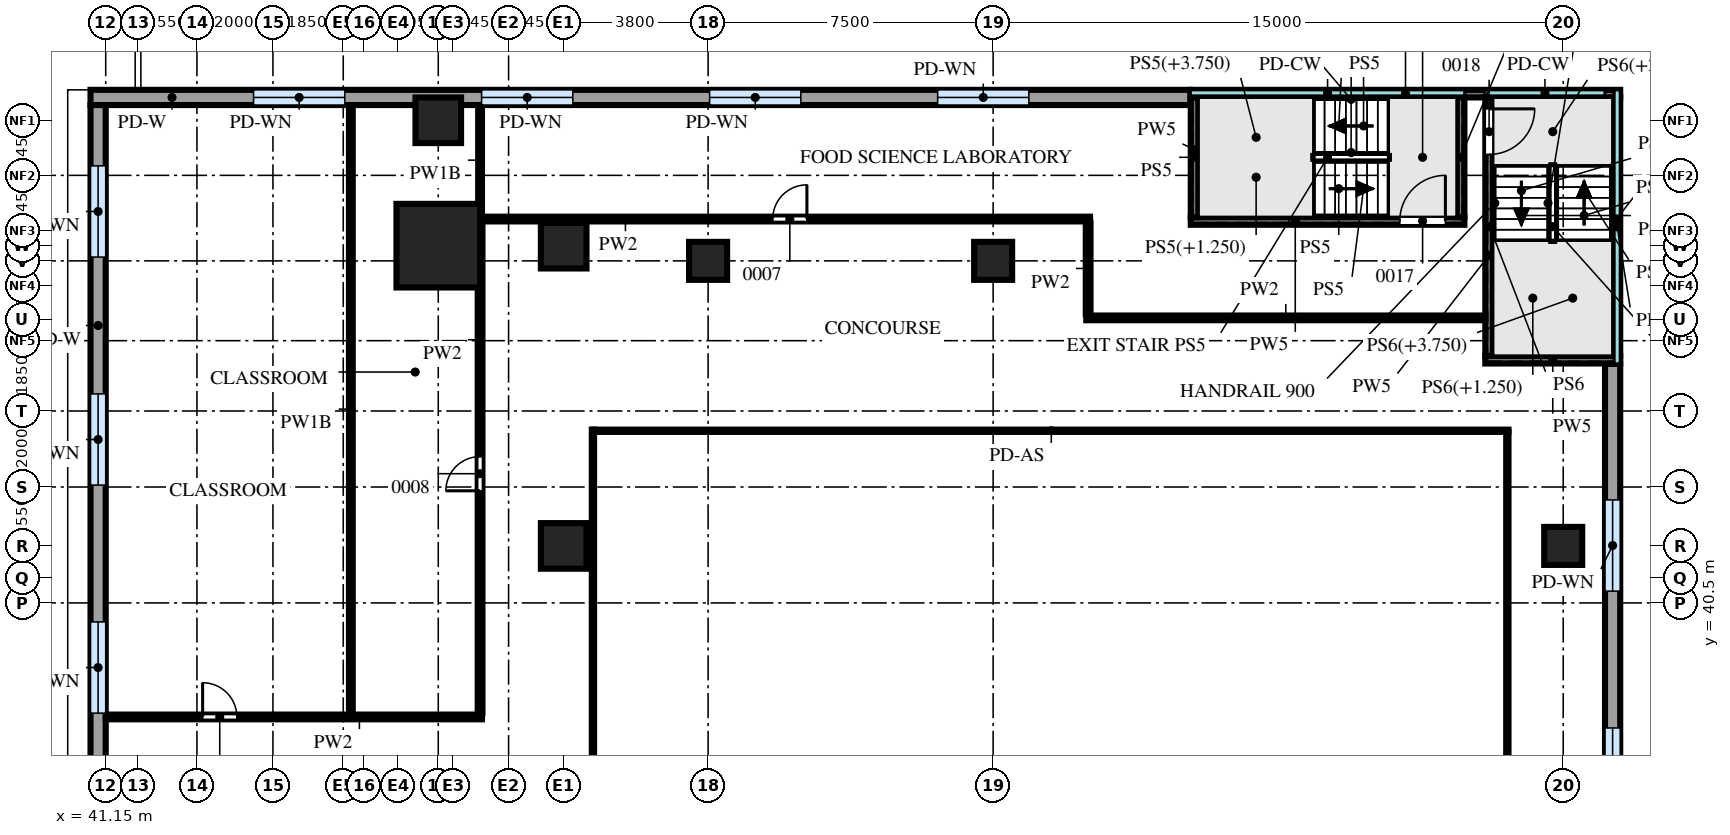
"""IFC4 building model, lengths in metres.
Left out: names, types, materials, properties, quantities, classifications, styles, units other than length and angle.
Written with IfcOpenShell. Run it as: python <this file> out.ifc"""

import sys

from ifc_helpers import new_model, si_unit, direction, frame, frame_2d, origin, origin_2d, place, context, subcontext, project, spatial, rectangle, extrude, source, transform, mapped, element, fill, save


model = new_model("IFC4")
c1 = context("Model", 3, precision=1e-05, world=origin(), true_north=direction((0.0, 1.0)))
c2 = subcontext(c1, "Body", "Model", "MODEL_VIEW")
j1 = project(units=[si_unit("LENGTHUNIT", "METRE"), si_unit("PLANEANGLEUNIT", "RADIAN")], contexts=[c1])
p1 = place(None, origin())
s1 = spatial("IfcSite", under=j1, at=p1, CompositionType="ELEMENT")
p2 = place(p1, origin())
s2 = spatial("IfcBuilding", under=s1, at=p2, CompositionType="ELEMENT")
p3 = place(p2, frame((0.0, 0.0, 23.5)))
s3 = spatial("IfcBuildingStorey", under=s2, at=p3, CompositionType="ELEMENT", Elevation=23.5)
m1 = source(origin(), c2, "Body", "SweptSolid", [
    extrude(rectangle(XDim=2.2, YDim=2.2, at=origin_2d()), origin(), (0.0, 0.0, 1.0), 4.7),
])
p4 = place(p3, frame((49.9, 49.9, 0.0), z_axis=(0.0, 0.0, 1.0), x_axis=(1.0, 0.0, 0.0)))
e1 = element("IfcColumn", 1, at=p4, inside=s3, PredefinedType="COLUMN", context=c2, shape_type="MappedRepresentation", body=[
    mapped(m1, transform((0.0, 0.0, 0.0))),
])
m2 = source(origin(), c2, "Body", "SweptSolid", [
    extrude(rectangle(XDim=1.2, YDim=1.2, at=origin_2d()), origin(), (0.0, 0.0, 1.0), 4.7),
])
for number, where, z_axis, x_axis in (
    (2, (53.2, 42.0, 0.0), (0.0, 0.0, 1.0), (1.0, 0.0, 0.0)),
    (3, (53.2, 49.9, 0.0), (0.0, 0.0, 1.0), (1.0, 0.0, 0.0)),
    (4, (49.9, 53.2, 0.0), (0.0, 0.0, 1.0), (1.0, 0.0, 0.0)),
):
    element("IfcColumn", number, at=place(p3, frame(where, z_axis=z_axis, x_axis=x_axis)), inside=s3, PredefinedType="COLUMN", context=c2, shape_type="MappedRepresentation", body=[
        mapped(m2, transform((0.0, 0.0, 0.0))),
    ])
m3 = source(origin(), c2, "Body", "SweptSolid", [
    extrude(rectangle(XDim=1.0, YDim=1.0, at=origin_2d()), origin(), (0.0, 0.0, 1.0), 4.7),
])
for number, where, z_axis, x_axis in (
    (5, (57.0, 49.5, 0.0), (0.0, 0.0, 1.0), (1.0, 0.0, 0.0)),
    (6, (64.5, 49.5, 0.0), (0.0, 0.0, 1.0), (1.0, 0.0, 0.0)),
    (7, (79.5, 42.0, 0.0), (0.0, 0.0, 1.0), (1.0, 0.0, 0.0)),
):
    element("IfcColumn", number, at=place(p3, frame(where, z_axis=z_axis, x_axis=x_axis)), inside=s3, PredefinedType="COLUMN", context=c2, shape_type="MappedRepresentation", body=[
        mapped(m3, transform((0.0, 0.0, 0.0))),
    ])
m4 = source(origin(), c2, "Body", "SweptSolid", [
    extrude(rectangle(XDim=39.58, YDim=0.4, at=frame_2d((19.79, 0.0))), origin(), (0.0, 0.0, 1.0), 4.7),
])
p5 = place(p3, frame((80.8, 7.21, 0.0), z_axis=(0.0, 0.0, 1.0), x_axis=(0.0, 1.0, 0.0)))
e8 = element("IfcWall", 8, at=p5, inside=s3, PredefinedType="SOLIDWALL", context=c2, shape_type="MappedRepresentation", body=[
    mapped(m4, transform((0.0, 0.0, 0.0))),
])
m5 = source(origin(), c2, "Body", "SweptSolid", [
    extrude(rectangle(XDim=2.4, YDim=2.4, at=frame_2d((1.2, 1.2))), frame((0.0, 0.21, 0.0), z_axis=(0.0, -1.0, 0.0), x_axis=(1.0, 0.0, 0.0)), (0.0, 0.0, 1.0), 0.42),
])
p6 = place(p5, frame((3.6, 0.0, 1.0)))
e9 = element("IfcOpeningElement", 9, at=p6, cuts=e8, PredefinedType="OPENING", context=c2, shape_type="MappedRepresentation", body=[
    mapped(m5, transform((0.0, 0.0, 0.0))),
])
p7 = place(p5, frame((9.6, 0.0, 1.0)))
e10 = element("IfcOpeningElement", 10, at=p7, cuts=e8, PredefinedType="OPENING", context=c2, shape_type="MappedRepresentation", body=[
    mapped(m5, transform((0.0, 0.0, 0.0))),
])
p8 = place(p5, frame((15.6, 0.0, 1.0)))
e11 = element("IfcOpeningElement", 11, at=p8, cuts=e8, PredefinedType="OPENING", context=c2, shape_type="MappedRepresentation", body=[
    mapped(m5, transform((0.0, 0.0, 0.0))),
])
p9 = place(p5, frame((21.6, 0.0, 1.0)))
e12 = element("IfcOpeningElement", 12, at=p9, cuts=e8, PredefinedType="OPENING", context=c2, shape_type="MappedRepresentation", body=[
    mapped(m5, transform((0.0, 0.0, 0.0))),
])
p10 = place(p5, frame((27.6, 0.0, 1.0)))
e13 = element("IfcOpeningElement", 13, at=p10, cuts=e8, PredefinedType="OPENING", context=c2, shape_type="MappedRepresentation", body=[
    mapped(m5, transform((0.0, 0.0, 0.0))),
])
p11 = place(p5, frame((33.6, 0.0, 1.0)))
e14 = element("IfcOpeningElement", 14, at=p11, cuts=e8, PredefinedType="OPENING", context=c2, shape_type="MappedRepresentation", body=[
    mapped(m5, transform((0.0, 0.0, 0.0))),
])
m6 = source(origin(), c2, "Body", "SweptSolid", [
    extrude(rectangle(XDim=28.94, YDim=0.4, at=frame_2d((14.47, 0.0))), origin(), (0.0, 0.0, 1.0), 4.7),
])
p12 = place(p3, frame((69.69, 53.8, 0.0), z_axis=(0.0, 0.0, 1.0), x_axis=(-1.0, 0.0, 0.0)))
e15 = element("IfcWall", 15, at=p12, inside=s3, PredefinedType="SOLIDWALL", context=c2, shape_type="MappedRepresentation", body=[
    mapped(m6, transform((0.0, 0.0, 0.0))),
])
p13 = place(p12, frame((4.25, 0.0, 1.0)))
e16 = element("IfcOpeningElement", 16, at=p13, cuts=e15, PredefinedType="OPENING", context=c2, shape_type="MappedRepresentation", body=[
    mapped(m5, transform((0.0, 0.0, 0.0))),
])
p14 = place(p12, frame((10.25, 0.0, 1.0)))
e17 = element("IfcOpeningElement", 17, at=p14, cuts=e15, PredefinedType="OPENING", context=c2, shape_type="MappedRepresentation", body=[
    mapped(m5, transform((0.0, 0.0, 0.0))),
])
p15 = place(p12, frame((16.25, 0.0, 1.0)))
e18 = element("IfcOpeningElement", 18, at=p15, cuts=e15, PredefinedType="OPENING", context=c2, shape_type="MappedRepresentation", body=[
    mapped(m5, transform((0.0, 0.0, 0.0))),
])
p16 = place(p12, frame((22.25, 0.0, 1.0)))
e19 = element("IfcOpeningElement", 19, at=p16, cuts=e15, PredefinedType="OPENING", context=c2, shape_type="MappedRepresentation", body=[
    mapped(m5, transform((0.0, 0.0, 0.0))),
])
m7 = source(origin(), c2, "Body", "SweptSolid", [
    extrude(rectangle(XDim=17.6, YDim=0.4, at=frame_2d((8.8, 0.0))), origin(), (0.0, 0.0, 1.0), 4.7),
])
p17 = place(p3, frame((40.95, 53.6, 0.0), z_axis=(0.0, 0.0, 1.0), x_axis=(0.0, -1.0, 0.0)))
e20 = element("IfcWall", 20, at=p17, inside=s3, PredefinedType="SOLIDWALL", context=c2, shape_type="MappedRepresentation", body=[
    mapped(m7, transform((0.0, 0.0, 0.0))),
])
p18 = place(p17, frame((1.6, 0.0, 1.0)))
e21 = element("IfcOpeningElement", 21, at=p18, cuts=e20, PredefinedType="OPENING", context=c2, shape_type="MappedRepresentation", body=[
    mapped(m5, transform((0.0, 0.0, 0.0))),
])
p19 = place(p17, frame((7.6, 0.0, 1.0)))
e22 = element("IfcOpeningElement", 22, at=p19, cuts=e20, PredefinedType="OPENING", context=c2, shape_type="MappedRepresentation", body=[
    mapped(m5, transform((0.0, 0.0, 0.0))),
])
p20 = place(p17, frame((13.6, 0.0, 1.0)))
e23 = element("IfcOpeningElement", 23, at=p20, cuts=e20, PredefinedType="OPENING", context=c2, shape_type="MappedRepresentation", body=[
    mapped(m5, transform((0.0, 0.0, 0.0))),
])
m8 = source(origin(), c2, "Body", "SweptSolid", [
    extrude(rectangle(XDim=36.06, YDim=0.06, at=frame_2d((18.03, 0.0))), origin(), (0.0, 0.0, 1.0), 4.7),
])
p21 = place(p3, frame((78.03, 8.94, 0.0), z_axis=(0.0, 0.0, 1.0), x_axis=(0.0, 1.0, 0.0)))
e24 = element("IfcWall", 24, at=p21, inside=s3, PredefinedType="SOLIDWALL", context=c2, shape_type="MappedRepresentation", body=[
    mapped(m8, transform((0.0, 0.0, 0.0))),
])
m9 = source(origin(), c2, "Body", "SweptSolid", [
    extrude(rectangle(XDim=24.06, YDim=0.06, at=frame_2d((12.03, 0.0))), origin(), (0.0, 0.0, 1.0), 4.7),
])
p22 = place(p3, frame((78.06, 45.03, 0.0), z_axis=(0.0, 0.0, 1.0), x_axis=(-1.0, 0.0, 0.0)))
e25 = element("IfcWall", 25, at=p22, inside=s3, PredefinedType="SOLIDWALL", context=c2, shape_type="MappedRepresentation", body=[
    mapped(m9, transform((0.0, 0.0, 0.0))),
])
p23 = place(p3, frame((53.97, 45.06, 0.0), z_axis=(0.0, 0.0, 1.0), x_axis=(0.0, -1.0, 0.0)))
e26 = element("IfcWall", 26, at=p23, inside=s3, PredefinedType="SOLIDWALL", context=c2, shape_type="MappedRepresentation", body=[
    mapped(m8, transform((0.0, 0.0, 0.0))),
])
m10 = source(origin(), c2, "Body", "SweptSolid", [
    extrude(rectangle(XDim=7.2, YDim=0.2, at=frame_2d((3.6, 0.0))), origin(), (0.0, 0.0, 1.0), 4.7),
])
p24 = place(p3, frame((69.7, 50.55, 0.0), z_axis=(0.0, 0.0, 1.0), x_axis=(1.0, 0.0, 0.0)))
e27 = element("IfcWall", 27, at=p24, inside=s3, PredefinedType="PARTITIONING", context=c2, shape_type="MappedRepresentation", body=[
    mapped(m10, transform((0.0, 0.0, 0.0))),
])
m11 = source(origin(), c2, "Body", "SweptSolid", [
    extrude(rectangle(XDim=1.2, YDim=2.1, at=frame_2d((0.6, 1.05))), frame((0.0, 0.11, 0.0), z_axis=(0.0, -1.0, 0.0), x_axis=(1.0, 0.0, 0.0)), (0.0, 0.0, 1.0), 0.22),
])
p25 = place(p24, frame((5.5, 0.0, 0.0)))
e28 = element("IfcOpeningElement", 28, at=p25, cuts=e27, PredefinedType="OPENING", context=c2, shape_type="MappedRepresentation", body=[
    mapped(m11, transform((0.0, 0.0, 0.0))),
])
m12 = source(origin(), c2, "Body", "SweptSolid", [
    extrude(rectangle(XDim=11.3, YDim=0.2, at=frame_2d((5.65, 0.0))), origin(), (0.0, 0.0, 1.0), 4.7),
])
p26 = place(p3, frame((69.7, 53.9, 0.0), z_axis=(0.0, 0.0, 1.0), x_axis=(1.0, 0.0, 0.0)))
e29 = element("IfcWall", 29, at=p26, inside=s3, PredefinedType="PARTITIONING", context=c2, shape_type="MappedRepresentation", body=[
    mapped(m12, transform((0.0, 0.0, 0.0))),
])
m13 = source(origin(), c2, "Body", "SweptSolid", [
    extrude(rectangle(XDim=3.15, YDim=0.2, at=frame_2d((1.575, 0.0))), origin(), (0.0, 0.0, 1.0), 4.7),
])
for number, where, z_axis, x_axis in (
    (30, (69.8, 50.65, 0.0), (0.0, 0.0, 1.0), (0.0, 1.0, 0.0)),
    (31, (76.8, 50.65, 0.0), (0.0, 0.0, 1.0), (0.0, 1.0, 0.0)),
):
    element("IfcWall", number, at=place(p3, frame(where, z_axis=z_axis, x_axis=x_axis)), inside=s3, PredefinedType="PARTITIONING", context=c2, shape_type="MappedRepresentation", body=[
        mapped(m13, transform((0.0, 0.0, 0.0))),
    ])
m14 = source(origin(), c2, "Body", "SweptSolid", [
    extrude(rectangle(XDim=3.55, YDim=0.2, at=frame_2d((1.775, 0.0))), origin(), (0.0, 0.0, 1.0), 4.7),
])
p27 = place(p3, frame((77.45, 46.9, 0.0), z_axis=(0.0, 0.0, 1.0), x_axis=(1.0, 0.0, 0.0)))
e32 = element("IfcWall", 32, at=p27, inside=s3, PredefinedType="PARTITIONING", context=c2, shape_type="MappedRepresentation", body=[
    mapped(m14, transform((0.0, 0.0, 0.0))),
])
m15 = source(origin(), c2, "Body", "SweptSolid", [
    extrude(rectangle(XDim=6.8, YDim=0.2, at=frame_2d((3.4, 0.0))), origin(), (0.0, 0.0, 1.0), 4.7),
])
p28 = place(p3, frame((77.55, 47.0, 0.0), z_axis=(0.0, 0.0, 1.0), x_axis=(0.0, 1.0, 0.0)))
e33 = element("IfcWall", 33, at=p28, inside=s3, PredefinedType="PARTITIONING", context=c2, shape_type="MappedRepresentation", body=[
    mapped(m15, transform((0.0, 0.0, 0.0))),
])
p29 = place(p28, frame((5.3, 0.0, 0.0)))
e34 = element("IfcOpeningElement", 34, at=p29, cuts=e33, PredefinedType="OPENING", context=c2, shape_type="MappedRepresentation", body=[
    mapped(m11, transform((0.0, 0.0, 0.0))),
])
p30 = place(p3, frame((80.9, 47.0, 0.0), z_axis=(0.0, 0.0, 1.0), x_axis=(0.0, 1.0, 0.0)))
e35 = element("IfcWall", 35, at=p30, inside=s3, PredefinedType="PARTITIONING", context=c2, shape_type="MappedRepresentation", body=[
    mapped(m15, transform((0.0, 0.0, 0.0))),
])
m16 = source(origin(), c2, "Body", "SweptSolid", [
    extrude(rectangle(XDim=9.9, YDim=0.125, at=frame_2d((4.95, 0.0))), origin(), (0.0, 0.0, 1.0), 4.7),
])
p31 = place(p3, frame((41.15, 37.5, 0.0), z_axis=(0.0, 0.0, 1.0), x_axis=(1.0, 0.0, 0.0)))
e36 = element("IfcWall", 36, at=p31, inside=s3, PredefinedType="PARTITIONING", context=c2, shape_type="MappedRepresentation", body=[
    mapped(m16, transform((0.0, 0.0, 0.0))),
])
m17 = source(origin(), c2, "Body", "SweptSolid", [
    extrude(rectangle(XDim=0.9, YDim=2.1, at=frame_2d((0.45, 1.05))), frame((0.0, 0.073, 0.0), z_axis=(0.0, -1.0, 0.0), x_axis=(1.0, 0.0, 0.0)), (0.0, 0.0, 1.0), 0.145),
])
p32 = place(p31, frame((2.55, 0.0, 0.0)))
e37 = element("IfcOpeningElement", 37, at=p32, cuts=e36, PredefinedType="OPENING", context=c2, shape_type="MappedRepresentation", body=[
    mapped(m17, transform((0.0, 0.0, 0.0))),
])
m18 = source(origin(), c2, "Body", "SweptSolid", [
    extrude(rectangle(XDim=16.0, YDim=0.1, at=frame_2d((8.0, 0.0))), origin(), (0.0, 0.0, 1.0), 4.7),
])
p33 = place(p3, frame((47.6, 37.6, 0.0), z_axis=(0.0, 0.0, 1.0), x_axis=(0.0, 1.0, 0.0)))
e38 = element("IfcWall", 38, at=p33, inside=s3, PredefinedType="PARTITIONING", context=c2, shape_type="MappedRepresentation", body=[
    mapped(m18, transform((0.0, 0.0, 0.0))),
])
m19 = source(origin(), c2, "Body", "SweptSolid", [
    extrude(rectangle(XDim=12.9, YDim=0.125, at=frame_2d((6.45, 0.0))), origin(), (0.0, 0.0, 1.0), 4.7),
])
p34 = place(p3, frame((51.0, 37.6, 0.0), z_axis=(0.0, 0.0, 1.0), x_axis=(0.0, 1.0, 0.0)))
e39 = element("IfcWall", 39, at=p34, inside=s3, PredefinedType="PARTITIONING", context=c2, shape_type="MappedRepresentation", body=[
    mapped(m19, transform((0.0, 0.0, 0.0))),
])
p35 = place(p34, frame((5.85, 0.0, 0.0)))
e40 = element("IfcOpeningElement", 40, at=p35, cuts=e39, PredefinedType="OPENING", context=c2, shape_type="MappedRepresentation", body=[
    mapped(m17, transform((0.0, 0.0, 0.0))),
])
m20 = source(origin(), c2, "Body", "SweptSolid", [
    extrude(rectangle(XDim=10.5, YDim=0.125, at=frame_2d((5.25, 0.0))), origin(), (0.0, 0.0, 1.0), 4.7),
])
p36 = place(p3, frame((66.95, 48.0, 0.0), z_axis=(0.0, 0.0, 1.0), x_axis=(1.0, 0.0, 0.0)))
e41 = element("IfcWall", 41, at=p36, inside=s3, PredefinedType="PARTITIONING", context=c2, shape_type="MappedRepresentation", body=[
    mapped(m20, transform((0.0, 0.0, 0.0))),
])
m21 = source(origin(), c2, "Body", "SweptSolid", [
    extrude(rectangle(XDim=2.4, YDim=0.125, at=frame_2d((1.2, 0.0))), origin(), (0.0, 0.0, 1.0), 4.7),
])
p37 = place(p3, frame((67.0, 48.1, 0.0), z_axis=(0.0, 0.0, 1.0), x_axis=(0.0, 1.0, 0.0)))
e42 = element("IfcWall", 42, at=p37, inside=s3, PredefinedType="PARTITIONING", context=c2, shape_type="MappedRepresentation", body=[
    mapped(m21, transform((0.0, 0.0, 0.0))),
])
m22 = source(origin(), c2, "Body", "SweptSolid", [
    extrude(rectangle(XDim=16.1, YDim=0.125, at=frame_2d((8.05, 0.0))), origin(), (0.0, 0.0, 1.0), 4.7),
])
p38 = place(p3, frame((50.95, 50.6, 0.0), z_axis=(0.0, 0.0, 1.0), x_axis=(1.0, 0.0, 0.0)))
e43 = element("IfcWall", 43, at=p38, inside=s3, PredefinedType="PARTITIONING", context=c2, shape_type="MappedRepresentation", body=[
    mapped(m22, transform((0.0, 0.0, 0.0))),
])
p39 = place(p38, frame((7.75, 0.0, 0.0)))
e44 = element("IfcOpeningElement", 44, at=p39, cuts=e43, PredefinedType="OPENING", context=c2, shape_type="MappedRepresentation", body=[
    mapped(m17, transform((0.0, 0.0, 0.0))),
])
m23 = source(origin(), c2, "Body", "SweptSolid", [
    extrude(rectangle(XDim=2.9, YDim=0.1, at=frame_2d((1.45, 0.0))), origin(), (0.0, 0.0, 1.0), 4.7),
])
p40 = place(p3, frame((51.0, 50.7, 0.0), z_axis=(0.0, 0.0, 1.0), x_axis=(0.0, 1.0, 0.0)))
e45 = element("IfcWall", 45, at=p40, inside=s3, PredefinedType="PARTITIONING", context=c2, shape_type="MappedRepresentation", body=[
    mapped(m23, transform((0.0, 0.0, 0.0))),
])
m24 = source(origin(), c2, "Body", "SweptSolid", [
    extrude(rectangle(XDim=2.4, YDim=2.4, at=frame_2d((1.2, 1.2))), frame((0.0, 0.03, 0.0), z_axis=(0.0, -1.0, 0.0), x_axis=(1.0, 0.0, 0.0)), (0.0, 0.0, 1.0), 0.06),
])
p41 = place(p10, origin())
e46 = element("IfcWindow", 46, at=p41, inside=s3, PartitioningType="SINGLE_PANEL", PredefinedType="WINDOW", context=c2, shape_type="MappedRepresentation", body=[
    mapped(m24, transform((0.0, 0.0, 0.0))),
])
fill(e13, e46)
p42 = place(p11, origin())
e47 = element("IfcWindow", 47, at=p42, inside=s3, PartitioningType="SINGLE_PANEL", PredefinedType="WINDOW", context=c2, shape_type="MappedRepresentation", body=[
    mapped(m24, transform((0.0, 0.0, 0.0))),
])
fill(e14, e47)
p43 = place(p13, origin())
e48 = element("IfcWindow", 48, at=p43, inside=s3, PartitioningType="SINGLE_PANEL", PredefinedType="WINDOW", context=c2, shape_type="MappedRepresentation", body=[
    mapped(m24, transform((0.0, 0.0, 0.0))),
])
fill(e16, e48)
p44 = place(p14, origin())
e49 = element("IfcWindow", 49, at=p44, inside=s3, PartitioningType="SINGLE_PANEL", PredefinedType="WINDOW", context=c2, shape_type="MappedRepresentation", body=[
    mapped(m24, transform((0.0, 0.0, 0.0))),
])
fill(e17, e49)
p45 = place(p15, origin())
e50 = element("IfcWindow", 50, at=p45, inside=s3, PartitioningType="SINGLE_PANEL", PredefinedType="WINDOW", context=c2, shape_type="MappedRepresentation", body=[
    mapped(m24, transform((0.0, 0.0, 0.0))),
])
fill(e18, e50)
p46 = place(p16, origin())
e51 = element("IfcWindow", 51, at=p46, inside=s3, PartitioningType="SINGLE_PANEL", PredefinedType="WINDOW", context=c2, shape_type="MappedRepresentation", body=[
    mapped(m24, transform((0.0, 0.0, 0.0))),
])
fill(e19, e51)
p47 = place(p18, origin())
e52 = element("IfcWindow", 52, at=p47, inside=s3, PartitioningType="SINGLE_PANEL", PredefinedType="WINDOW", context=c2, shape_type="MappedRepresentation", body=[
    mapped(m24, transform((0.0, 0.0, 0.0))),
])
fill(e21, e52)
p48 = place(p19, origin())
e53 = element("IfcWindow", 53, at=p48, inside=s3, PartitioningType="SINGLE_PANEL", PredefinedType="WINDOW", context=c2, shape_type="MappedRepresentation", body=[
    mapped(m24, transform((0.0, 0.0, 0.0))),
])
fill(e22, e53)
p49 = place(p20, origin())
e54 = element("IfcWindow", 54, at=p49, inside=s3, PartitioningType="SINGLE_PANEL", PredefinedType="WINDOW", context=c2, shape_type="MappedRepresentation", body=[
    mapped(m24, transform((0.0, 0.0, 0.0))),
])
fill(e23, e54)
m25 = source(origin(), c2, "Body", "SweptSolid", [
    extrude(rectangle(XDim=0.9, YDim=2.1, at=frame_2d((0.45, 1.05))), frame((0.0, 0.025, 0.0), z_axis=(0.0, -1.0, 0.0), x_axis=(1.0, 0.0, 0.0)), (0.0, 0.0, 1.0), 0.05),
])
p50 = place(p32, origin())
e55 = element("IfcDoor", 55, at=p50, inside=s3, OperationType="SINGLE_SWING_RIGHT", PredefinedType="DOOR", context=c2, shape_type="MappedRepresentation", body=[
    mapped(m25, transform((0.0, 0.0, 0.0))),
])
fill(e37, e55)
p51 = place(p35, origin())
e56 = element("IfcDoor", 56, at=p51, inside=s3, OperationType="SINGLE_SWING_RIGHT", PredefinedType="DOOR", context=c2, shape_type="MappedRepresentation", body=[
    mapped(m25, transform((0.0, 0.0, 0.0))),
])
fill(e40, e56)
p52 = place(p39, origin())
e57 = element("IfcDoor", 57, at=p52, inside=s3, OperationType="SINGLE_SWING_LEFT", PredefinedType="DOOR", context=c2, shape_type="MappedRepresentation", body=[
    mapped(m25, transform((0.0, 0.0, 0.0))),
])
fill(e44, e57)
m26 = source(origin(), c2, "Body", "SweptSolid", [
    extrude(rectangle(XDim=1.2, YDim=2.1, at=frame_2d((0.6, 1.05))), frame((0.0, 0.025, 0.0), z_axis=(0.0, -1.0, 0.0), x_axis=(1.0, 0.0, 0.0)), (0.0, 0.0, 1.0), 0.05),
])
p53 = place(p25, origin())
e58 = element("IfcDoor", 58, at=p53, inside=s3, OperationType="SINGLE_SWING_LEFT", PredefinedType="DOOR", context=c2, shape_type="MappedRepresentation", body=[
    mapped(m26, transform((0.0, 0.0, 0.0))),
])
fill(e28, e58)
p54 = place(p29, origin())
e59 = element("IfcDoor", 59, at=p54, inside=s3, OperationType="SINGLE_SWING_RIGHT", PredefinedType="DOOR", context=c2, shape_type="MappedRepresentation", body=[
    mapped(m26, transform((0.0, 0.0, 0.0))),
])
fill(e34, e59)
save(model, sys.argv[1])
